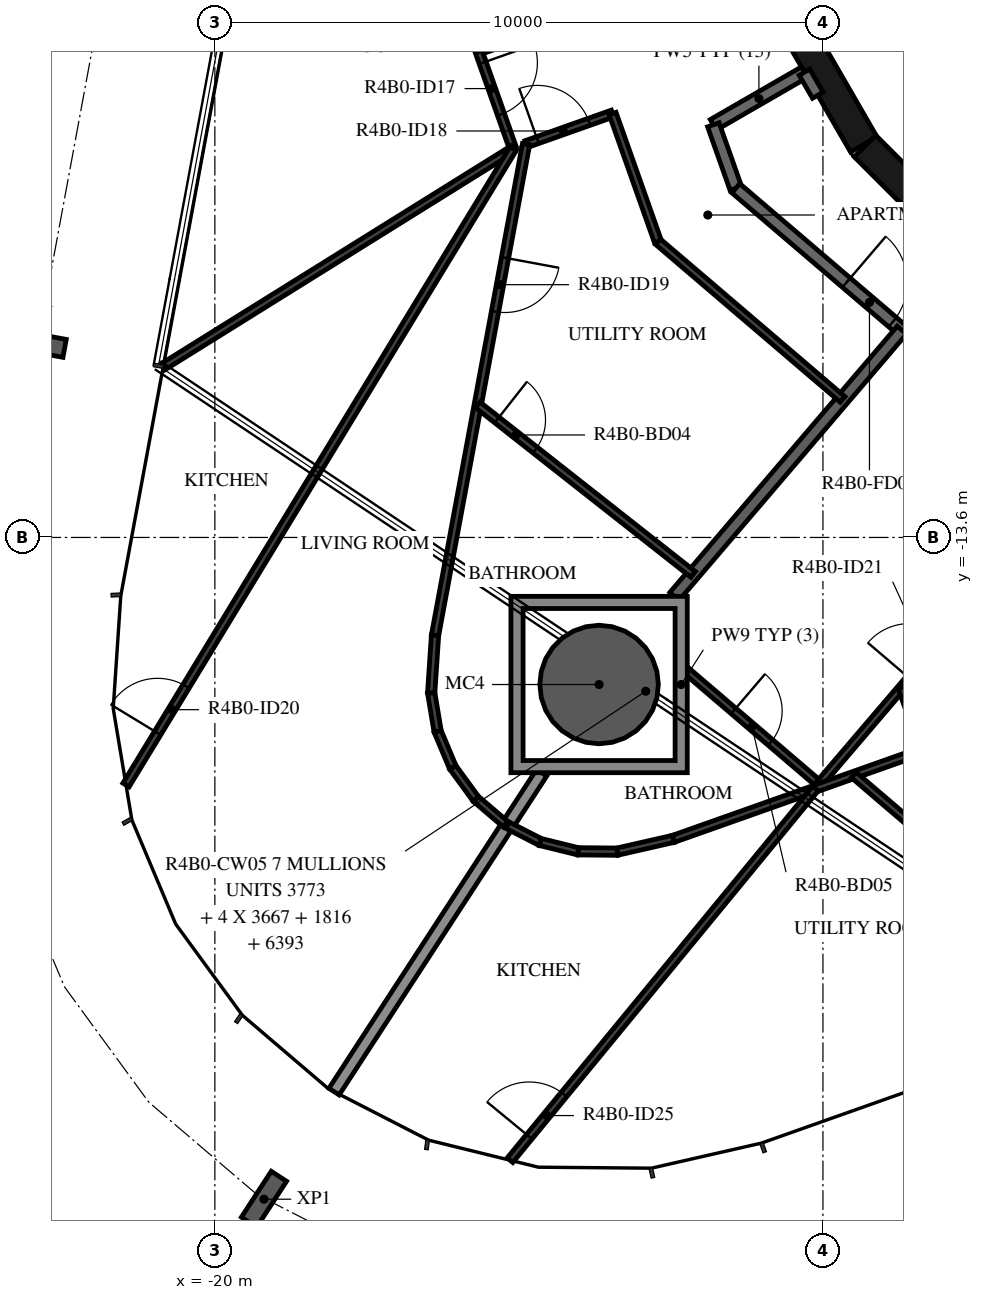
"""IFC4 building model, lengths in metres.
Left out: names, types, materials, properties, quantities, classifications, styles, units other than length and angle.
Written with IfcOpenShell. Run it as: python <this file> out.ifc"""

import sys

from ifc_helpers import new_model, si_unit, direction, frame, frame_2d, origin, origin_2d, place, context, subcontext, project, spatial, polyline, rectangle, hollow_circle, i_section, outline, extrude, element, fill, save


model = new_model("IFC4")
c1 = context("Model", 3, precision=1e-05, world=origin(), true_north=direction((0.0, 1.0)))
c2 = subcontext(c1, "Body", "Model", "MODEL_VIEW")
j1 = project(units=[si_unit("LENGTHUNIT", "METRE"), si_unit("PLANEANGLEUNIT", "RADIAN")], contexts=[c1])
p1 = place(None, origin())
s1 = spatial("IfcSite", under=j1, at=p1, CompositionType="ELEMENT")
p2 = place(p1, origin())
s2 = spatial("IfcBuilding", under=s1, at=p2, CompositionType="ELEMENT")
p3 = place(p2, frame((0.0, 0.0, 165.7)))
s3 = spatial("IfcBuildingStorey", under=s2, at=p3, CompositionType="ELEMENT", Elevation=165.7)
p4 = place(p3, frame((-13.681, -16.019, -0.38), z_axis=(0.0, 0.0, 1.0), x_axis=(1.0, 0.0, 0.0)))
e1 = element("IfcColumn", 1, at=p4, inside=s3, PredefinedType="COLUMN", context=c2, shape_type="SweptSolid", body=[
    extrude(hollow_circle(Radius=0.975, WallThickness=0.045, at=origin_2d()), origin(), (0.0, 0.0, 1.0), 3.5),
])
for number, where, z_axis, x_axis in (
    (2, (-22.914, -10.409, -0.38), (0.0, 0.0, 1.0), (0.182, 0.983, 0.0)),
    (3, (-19.192, -24.483, -0.38), (0.0, 0.0, 1.0), (-0.838, 0.546, 0.0)),
):
    element("IfcColumn", number, at=place(p3, frame(where, z_axis=z_axis, x_axis=x_axis)), inside=s3, PredefinedType="COLUMN", context=c2, shape_type="SweptSolid", body=[
        extrude(i_section(OverallWidth=0.3, OverallDepth=0.9, WebThickness=0.019, FlangeThickness=0.035, FilletRadius=0.03, at=origin_2d()), origin(), (0.0, 0.0, 1.0), 3.5),
    ])
p5 = place(p3, frame((-10.845, -4.51, 0.0), z_axis=(0.0, 0.0, 1.0), x_axis=(0.500087131594, -0.865975092491, 0.0)))
e4 = element("IfcWall", 4, at=p5, inside=s3, PredefinedType="SHEAR", context=c2, shape_type="SweptSolid", body=[
    extrude(rectangle(XDim=3.033, YDim=0.5, at=frame_2d((1.516, 0.0))), origin(), (0.0, 0.0, 1.0), 3.12),
])
p6 = place(p3, frame((-9.308, -7.164, 0.0), z_axis=(0.0, 0.0, 1.0), x_axis=(0.707106781187, -0.707106781187, 0.0)))
e5 = element("IfcWall", 5, at=p6, inside=s3, PredefinedType="SHEAR", context=c2, shape_type="SweptSolid", body=[
    extrude(rectangle(XDim=3.032, YDim=0.5, at=frame_2d((1.516, 0.0))), origin(), (0.0, 0.0, 1.0), 3.12),
])
p7 = place(p3, frame((-10.303, -5.949, 0.0), z_axis=(0.0, 0.0, 1.0), x_axis=(-0.866021168401, -0.500007335828, 0.0)))
e6 = element("IfcWall", 6, at=p7, inside=s3, PredefinedType="STANDARD", context=c2, shape_type="SweptSolid", body=[
    extrude(rectangle(XDim=1.731, YDim=0.2, at=frame_2d((0.865, 0.0))), origin(), (0.0, 0.0, 1.0), 3.12),
])
p8 = place(p3, frame((-11.802, -6.814, 0.0), z_axis=(0.0, 0.0, 1.0), x_axis=(0.333904297771, -0.942606980629, 0.0)))
e7 = element("IfcWall", 7, at=p8, inside=s3, PredefinedType="STANDARD", context=c2, shape_type="SweptSolid", body=[
    extrude(rectangle(XDim=1.107, YDim=0.2, at=frame_2d((0.553, 0.0))), origin(), (0.0, 0.0, 1.0), 3.12),
])
p9 = place(p3, frame((-11.433, -7.858, 0.0), z_axis=(0.0, 0.0, 1.0), x_axis=(0.760412154545, -0.649440801937, 0.0)))
e8 = element("IfcWall", 8, at=p9, inside=s3, PredefinedType="STANDARD", context=c2, shape_type="SweptSolid", body=[
    extrude(rectangle(XDim=7.181, YDim=0.2, at=frame_2d((3.59, 0.0))), origin(), (0.0, 0.0, 1.0), 3.12),
])
p10 = place(p9, frame((2.39, 0.0, 0.0)))
e9 = element("IfcOpeningElement", 9, at=p10, cuts=e8, PredefinedType="OPENING", context=c2, shape_type="SweptSolid", body=[
    extrude(rectangle(XDim=1.0, YDim=2.1, at=frame_2d((0.5, 1.05))), frame((0.0, 0.11, 0.0), z_axis=(0.0, -1.0, 0.0), x_axis=(1.0, 0.0, 0.0)), (0.0, 0.0, 1.0), 0.22),
])
p11 = place(p3, frame((-10.303, -5.949, 0.0), z_axis=(0.0, 0.0, 1.0), x_axis=(0.499980071345, -0.866036909293, 0.0)))
e10 = element("IfcWall", 10, at=p11, inside=s3, PredefinedType="STANDARD", context=c2, shape_type="SweptSolid", body=[
    extrude(rectangle(XDim=0.438, YDim=0.2, at=frame_2d((0.219, 0.0))), origin(), (0.0, 0.0, 1.0), 3.12),
])
p12 = place(p3, frame((-12.441, -14.569, 0.0), z_axis=(0.0, 0.0, 1.0), x_axis=(0.649446013128, 0.760407703822, 0.0)))
e11 = element("IfcWall", 11, at=p12, inside=s3, PredefinedType="STANDARD", context=c2, shape_type="SweptSolid", body=[
    extrude(rectangle(XDim=5.758, YDim=0.2, at=frame_2d((2.879, 0.0))), origin(), (0.0, 0.0, 1.0), 3.12),
])
p13 = place(p3, frame((-18.04, -22.713, 0.0), z_axis=(0.0, 0.0, 1.0), x_axis=(0.545628572271, 0.838027124335, 0.0)))
e12 = element("IfcWall", 12, at=p13, inside=s3, PredefinedType="STANDARD", context=c2, shape_type="SweptSolid", body=[
    extrude(rectangle(XDim=6.258, YDim=0.2, at=frame_2d((3.129, 0.0))), origin(), (0.0, 0.0, 1.0), 2.73),
])
p14 = place(p3, frame((-14.524, -5.203, 0.0), z_axis=(0.0, 0.0, 1.0), x_axis=(-0.942657704592, -0.333761070187, 0.0)))
e13 = element("IfcWall", 13, at=p14, inside=s3, PredefinedType="PARTITIONING", context=c2, shape_type="SweptSolid", body=[
    extrude(rectangle(XDim=1.208, YDim=0.12, at=frame_2d((0.604, 0.0))), origin(), (0.0, 0.0, 1.0), 3.12),
])
p15 = place(p3, frame((-15.663, -5.606, 0.0), z_axis=(0.0, 0.0, 1.0), x_axis=(0.333751436931, -0.942661115325, 0.0)))
e14 = element("IfcWall", 14, at=p15, inside=s3, PredefinedType="PARTITIONING", context=c2, shape_type="SweptSolid", body=[
    extrude(rectangle(XDim=1.7, YDim=0.12, at=frame_2d((0.85, 0.0))), origin(), (0.0, 0.0, 1.0), 3.12),
])
p16 = place(p15, frame((0.2, 0.0, 0.0)))
e15 = element("IfcOpeningElement", 15, at=p16, cuts=e14, PredefinedType="OPENING", context=c2, shape_type="SweptSolid", body=[
    extrude(rectangle(XDim=0.9, YDim=2.1, at=frame_2d((0.45, 1.05))), frame((0.0, 0.07, 0.0), z_axis=(0.0, -1.0, 0.0), x_axis=(1.0, 0.0, 0.0)), (0.0, 0.0, 1.0), 0.14),
])
p17 = place(p3, frame((-14.882, -7.133, 0.0), z_axis=(0.0, 0.0, 1.0), x_axis=(0.942631466676, 0.333835165961, 0.0)))
e16 = element("IfcWall", 16, at=p17, inside=s3, PredefinedType="PARTITIONING", context=c2, shape_type="SweptSolid", body=[
    extrude(rectangle(XDim=1.51, YDim=0.12, at=frame_2d((0.755, 0.0))), origin(), (0.0, 0.0, 1.0), 3.12),
])
p18 = place(p17, frame((0.2, 0.0, 0.0)))
e17 = element("IfcOpeningElement", 17, at=p18, cuts=e16, PredefinedType="OPENING", context=c2, shape_type="SweptSolid", body=[
    extrude(rectangle(XDim=0.9, YDim=2.1, at=frame_2d((0.45, 1.05))), frame((0.0, 0.07, 0.0), z_axis=(0.0, -1.0, 0.0), x_axis=(1.0, 0.0, 0.0)), (0.0, 0.0, 1.0), 0.14),
])
p19 = place(p3, frame((-13.459, -6.629, 0.0), z_axis=(0.0, 0.0, 1.0), x_axis=(0.333790565501, -0.942647260847, 0.0)))
e18 = element("IfcWall", 18, at=p19, inside=s3, PredefinedType="PARTITIONING", context=c2, shape_type="SweptSolid", body=[
    extrude(rectangle(XDim=2.237, YDim=0.12, at=frame_2d((1.118, 0.0))), origin(), (0.0, 0.0, 1.0), 3.12),
])
p20 = place(p3, frame((-12.713, -8.737, 0.0), z_axis=(0.0, 0.0, 1.0), x_axis=(0.760420863476, -0.649430604754, 0.0)))
e19 = element("IfcWall", 19, at=p20, inside=s3, PredefinedType="PARTITIONING", context=c2, shape_type="SweptSolid", body=[
    extrude(rectangle(XDim=3.992, YDim=0.12, at=frame_2d((1.996, 0.0))), origin(), (0.0, 0.0, 1.0), 3.12),
])
p21 = place(p3, frame((-20.849, -10.792, 0.0), z_axis=(0.0, 0.0, 1.0), x_axis=(0.848835001009, 0.528657867682, 0.0)))
e20 = element("IfcWall", 20, at=p21, inside=s3, PredefinedType="PARTITIONING", context=c2, shape_type="SweptSolid", body=[
    extrude(rectangle(XDim=6.778, YDim=0.12, at=frame_2d((3.389, 0.0))), origin(), (0.0, 0.0, 1.0), 3.12),
])
p22 = place(p3, frame((-21.461, -17.671, 0.0), z_axis=(0.0, 0.0, 1.0), x_axis=(0.519791999186, 0.854292852353, 0.0)))
e21 = element("IfcWall", 21, at=p22, inside=s3, PredefinedType="PARTITIONING", context=c2, shape_type="SweptSolid", body=[
    extrude(rectangle(XDim=12.247, YDim=0.12, at=frame_2d((6.124, 0.0))), origin(), (0.0, 0.0, 1.0), 3.12),
])
p23 = place(p22, frame((1.0, 0.0, 0.0)))
e22 = element("IfcOpeningElement", 22, at=p23, cuts=e21, PredefinedType="OPENING", context=c2, shape_type="SweptSolid", body=[
    extrude(rectangle(XDim=0.9, YDim=2.1, at=frame_2d((0.45, 1.05))), frame((0.0, 0.07, 0.0), z_axis=(0.0, -1.0, 0.0), x_axis=(1.0, 0.0, 0.0)), (0.0, 0.0, 1.0), 0.14),
])
p24 = place(p3, frame((-14.882, -7.133, 0.0), z_axis=(0.0, 0.0, 1.0), x_axis=(-0.182231858218, -0.983255587246, 0.0)))
e23 = element("IfcWall", 23, at=p24, inside=s3, PredefinedType="PARTITIONING", context=c2, shape_type="SweptSolid", body=[
    extrude(rectangle(XDim=8.215, YDim=0.12, at=frame_2d((4.107, 0.0))), origin(), (0.0, 0.0, 1.0), 3.12),
])
p25 = place(p24, frame((1.9, 0.0, 0.0)))
e24 = element("IfcOpeningElement", 24, at=p25, cuts=e23, PredefinedType="OPENING", context=c2, shape_type="SweptSolid", body=[
    extrude(rectangle(XDim=0.9, YDim=2.1, at=frame_2d((0.45, 1.05))), frame((0.0, 0.07, 0.0), z_axis=(0.0, -1.0, 0.0), x_axis=(1.0, 0.0, 0.0)), (0.0, 0.0, 1.0), 0.14),
])
p26 = place(p3, frame((-15.677, -11.42, 0.0), z_axis=(0.0, 0.0, 1.0), x_axis=(0.785821888461, -0.618452875824, 0.0)))
e25 = element("IfcWall", 25, at=p26, inside=s3, PredefinedType="PARTITIONING", context=c2, shape_type="SweptSolid", body=[
    extrude(rectangle(XDim=4.507, YDim=0.12, at=frame_2d((2.254, 0.0))), origin(), (0.0, 0.0, 1.0), 3.12),
])
p27 = place(p26, frame((0.4, 0.0, 0.0)))
e26 = element("IfcOpeningElement", 26, at=p27, cuts=e25, PredefinedType="OPENING", context=c2, shape_type="SweptSolid", body=[
    extrude(rectangle(XDim=0.8, YDim=2.1, at=frame_2d((0.4, 1.05))), frame((0.0, 0.07, 0.0), z_axis=(0.0, -1.0, 0.0), x_axis=(1.0, 0.0, 0.0)), (0.0, 0.0, 1.0), 0.14),
])
for number, where, z_axis, x_axis in (
    (27, (-15.22, -18.315, 0.0), (0.0, 0.0, 1.0), (-0.76, 0.65, 0.0)),
    (28, (-15.708, -17.898, 0.0), (0.0, 0.0, 1.0), (-0.59, 0.807, 0.0)),
):
    element("IfcWall", number, at=place(p3, frame(where, z_axis=z_axis, x_axis=x_axis)), inside=s3, PredefinedType="PARTITIONING", context=c2, shape_type="SweptSolid", body=[
        extrude(rectangle(XDim=0.642, YDim=0.12, at=frame_2d((0.321, 0.0))), origin(), (0.0, 0.0, 1.0), 3.12),
    ])
p28 = place(p3, frame((-16.087, -17.38, 0.0), z_axis=(0.0, 0.0, 1.0), x_axis=(-0.387852998664, 0.921721243884, 0.0)))
e29 = element("IfcWall", 29, at=p28, inside=s3, PredefinedType="PARTITIONING", context=c2, shape_type="SweptSolid", body=[
    extrude(rectangle(XDim=0.642, YDim=0.12, at=frame_2d((0.321, 0.0))), origin(), (0.0, 0.0, 1.0), 3.12),
])
p29 = place(p3, frame((-16.336, -16.788, 0.0), z_axis=(0.0, 0.0, 1.0), x_axis=(-0.165077433319, 0.986280609669, 0.0)))
e30 = element("IfcWall", 30, at=p29, inside=s3, PredefinedType="PARTITIONING", context=c2, shape_type="SweptSolid", body=[
    extrude(rectangle(XDim=0.642, YDim=0.12, at=frame_2d((0.321, 0.0))), origin(), (0.0, 0.0, 1.0), 3.12),
])
p30 = place(p3, frame((-16.442, -16.155, 0.0), z_axis=(0.0, 0.0, 1.0), x_axis=(0.066775688713, 0.997768012815, 0.0)))
e31 = element("IfcWall", 31, at=p30, inside=s3, PredefinedType="PARTITIONING", context=c2, shape_type="SweptSolid", body=[
    extrude(rectangle(XDim=0.947, YDim=0.12, at=frame_2d((0.474, 0.0))), origin(), (0.0, 0.0, 1.0), 3.12),
])
p31 = place(p3, frame((-12.231, -15.804, 0.0), z_axis=(0.0, 0.0, 1.0), x_axis=(0.760403625387, -0.649450788357, 0.0)))
e32 = element("IfcWall", 32, at=p31, inside=s3, PredefinedType="PARTITIONING", context=c2, shape_type="SweptSolid", body=[
    extrude(rectangle(XDim=2.852, YDim=0.12, at=frame_2d((1.426, 0.0))), origin(), (0.0, 0.0, 1.0), 3.12),
])
p32 = place(p31, frame((1.0, 0.0, 0.0)))
e33 = element("IfcOpeningElement", 33, at=p32, cuts=e32, PredefinedType="OPENING", context=c2, shape_type="SweptSolid", body=[
    extrude(rectangle(XDim=0.8, YDim=2.1, at=frame_2d((0.4, 1.05))), frame((0.0, 0.07, 0.0), z_axis=(0.0, -1.0, 0.0), x_axis=(1.0, 0.0, 0.0)), (0.0, 0.0, 1.0), 0.14),
])
p33 = place(p3, frame((-10.063, -17.656, 0.0), z_axis=(0.0, 0.0, 1.0), x_axis=(0.649451567172, 0.760402960211, 0.0)))
e34 = element("IfcWall", 34, at=p33, inside=s3, PredefinedType="PARTITIONING", context=c2, shape_type="SweptSolid", body=[
    extrude(rectangle(XDim=5.061, YDim=0.12, at=frame_2d((2.531, 0.0))), origin(), (0.0, 0.0, 1.0), 3.12),
])
p34 = place(p33, frame((2.288, 0.0, 0.0)))
e35 = element("IfcOpeningElement", 35, at=p34, cuts=e34, PredefinedType="OPENING", context=c2, shape_type="SweptSolid", body=[
    extrude(rectangle(XDim=0.9, YDim=2.1, at=frame_2d((0.45, 1.05))), frame((0.0, 0.07, 0.0), z_axis=(0.0, -1.0, 0.0), x_axis=(1.0, 0.0, 0.0)), (0.0, 0.0, 1.0), 0.14),
])
p35 = place(p3, frame((-1.871, -14.807, 0.0), z_axis=(0.0, 0.0, 1.0), x_axis=(-0.942640759962, -0.333808923874, 0.0)))
e36 = element("IfcWall", 36, at=p35, inside=s3, PredefinedType="PARTITIONING", context=c2, shape_type="SweptSolid", body=[
    extrude(rectangle(XDim=11.234, YDim=0.12, at=frame_2d((5.617, 0.0))), origin(), (0.0, 0.0, 1.0), 3.12),
])
p36 = place(p3, frame((-12.461, -18.557, 0.0), z_axis=(0.0, 0.0, 1.0), x_axis=(-0.975039040601, -0.222033486897, 0.0)))
e37 = element("IfcWall", 37, at=p36, inside=s3, PredefinedType="PARTITIONING", context=c2, shape_type="SweptSolid", body=[
    extrude(rectangle(XDim=0.947, YDim=0.12, at=frame_2d((0.473, 0.0))), origin(), (0.0, 0.0, 1.0), 3.12),
])
p37 = place(p3, frame((-13.384, -18.767, 0.0), z_axis=(0.0, 0.0, 1.0), x_axis=(-0.999965015064, 0.008364726362, 0.0)))
e38 = element("IfcWall", 38, at=p37, inside=s3, PredefinedType="PARTITIONING", context=c2, shape_type="SweptSolid", body=[
    extrude(rectangle(XDim=0.642, YDim=0.12, at=frame_2d((0.321, 0.0))), origin(), (0.0, 0.0, 1.0), 3.12),
])
p38 = place(p3, frame((-14.026, -18.762, 0.0), z_axis=(0.0, 0.0, 1.0), x_axis=(-0.970964611728, 0.239223165208, 0.0)))
e39 = element("IfcWall", 39, at=p38, inside=s3, PredefinedType="PARTITIONING", context=c2, shape_type="SweptSolid", body=[
    extrude(rectangle(XDim=0.642, YDim=0.12, at=frame_2d((0.321, 0.0))), origin(), (0.0, 0.0, 1.0), 3.12),
])
p39 = place(p3, frame((-14.649, -18.608, 0.0), z_axis=(0.0, 0.0, 1.0), x_axis=(-0.889695551631, 0.456554296232, 0.0)))
e40 = element("IfcWall", 40, at=p39, inside=s3, PredefinedType="PARTITIONING", context=c2, shape_type="SweptSolid", body=[
    extrude(rectangle(XDim=0.605, YDim=0.12, at=frame_2d((0.302, 0.0))), origin(), (0.0, 0.0, 1.0), 3.12),
])
p40 = place(p3, frame((-15.146, -23.841, 0.0), z_axis=(0.0, 0.0, 1.0), x_axis=(0.634970373647, 0.772536487547, 0.0)))
e41 = element("IfcWall", 41, at=p40, inside=s3, PredefinedType="PARTITIONING", context=c2, shape_type="SweptSolid", body=[
    extrude(rectangle(XDim=7.912, YDim=0.12, at=frame_2d((3.956, 0.0))), origin(), (0.0, 0.0, 1.0), 3.12),
])
p41 = place(p40, frame((0.5, 0.0, 0.0)))
e42 = element("IfcOpeningElement", 42, at=p41, cuts=e41, PredefinedType="OPENING", context=c2, shape_type="SweptSolid", body=[
    extrude(rectangle(XDim=0.9, YDim=2.1, at=frame_2d((0.45, 1.05))), frame((0.0, 0.07, 0.0), z_axis=(0.0, -1.0, 0.0), x_axis=(1.0, 0.0, 0.0)), (0.0, 0.0, 1.0), 0.14),
])
p42 = place(p3, frame((-8.342, -17.098, 0.0), z_axis=(0.0, 0.0, 1.0), x_axis=(-0.333801646268, 0.942643337084, 0.0)))
e43 = element("IfcWall", 43, at=p42, inside=s3, PredefinedType="PARTITIONING", context=c2, shape_type="SweptSolid", body=[
    extrude(rectangle(XDim=1.093, YDim=0.12, at=frame_2d((0.546, 0.0))), origin(), (0.0, 0.0, 1.0), 3.12),
])
p43 = place(p3, frame((-4.927, -21.406, 0.0), z_axis=(0.0, 0.0, 1.0), x_axis=(-0.760409236665, 0.649444218385, 0.0)))
e44 = element("IfcWall", 44, at=p43, inside=s3, PredefinedType="PARTITIONING", context=c2, shape_type="SweptSolid", body=[
    extrude(rectangle(XDim=6.004, YDim=0.12, at=frame_2d((3.002, 0.0))), origin(), (0.0, 0.0, 1.0), 3.12),
])
p44 = place(p43, frame((0.4, 0.0, 0.0)))
e45 = element("IfcOpeningElement", 45, at=p44, cuts=e44, PredefinedType="OPENING", context=c2, shape_type="SweptSolid", body=[
    extrude(rectangle(XDim=0.9, YDim=2.1, at=frame_2d((0.45, 1.05))), frame((0.0, 0.07, 0.0), z_axis=(0.0, -1.0, 0.0), x_axis=(1.0, 0.0, 0.0)), (0.0, 0.0, 1.0), 0.14),
])
p45 = place(p3, origin())
e46 = element("IfcWall", 46, at=p45, inside=s3, PredefinedType="STANDARD", context=c2, shape_type="SweptSolid", body=[
    extrude(outline(polyline([(-12.231, -14.569), (-12.231, -17.469), (-15.131, -17.469), (-15.131, -14.569), (-12.231, -14.569)]), holes=[polyline([(-14.931, -17.269), (-12.431, -17.269), (-12.431, -14.769), (-14.931, -14.769), (-14.931, -17.269)])]), origin(), (0.0, 0.0, 1.0), 3.12),
])
p46 = place(p10, origin())
e47 = element("IfcDoor", 47, at=p46, inside=s3, OperationType="SINGLE_SWING_RIGHT", PredefinedType="DOOR", context=c2, shape_type="SweptSolid", body=[
    extrude(rectangle(XDim=1.0, YDim=2.1, at=frame_2d((0.5, 1.05))), frame((0.0, 0.025, 0.0), z_axis=(0.0, -1.0, 0.0), x_axis=(1.0, 0.0, 0.0)), (0.0, 0.0, 1.0), 0.05),
])
fill(e9, e47)
p47 = place(p16, origin())
e48 = element("IfcDoor", 48, at=p47, inside=s3, OperationType="SINGLE_SWING_RIGHT", PredefinedType="DOOR", context=c2, shape_type="SweptSolid", body=[
    extrude(rectangle(XDim=0.9, YDim=2.1, at=frame_2d((0.45, 1.05))), frame((0.0, 0.025, 0.0), z_axis=(0.0, -1.0, 0.0), x_axis=(1.0, 0.0, 0.0)), (0.0, 0.0, 1.0), 0.05),
])
fill(e15, e48)
p48 = place(p18, origin())
e49 = element("IfcDoor", 49, at=p48, inside=s3, OperationType="SINGLE_SWING_LEFT", PredefinedType="DOOR", context=c2, shape_type="SweptSolid", body=[
    extrude(rectangle(XDim=0.9, YDim=2.1, at=frame_2d((0.45, 1.05))), frame((0.0, 0.025, 0.0), z_axis=(0.0, -1.0, 0.0), x_axis=(1.0, 0.0, 0.0)), (0.0, 0.0, 1.0), 0.05),
])
fill(e17, e49)
p49 = place(p25, origin())
e50 = element("IfcDoor", 50, at=p49, inside=s3, OperationType="SINGLE_SWING_RIGHT", PredefinedType="DOOR", context=c2, shape_type="SweptSolid", body=[
    extrude(rectangle(XDim=0.9, YDim=2.1, at=frame_2d((0.45, 1.05))), frame((0.0, 0.025, 0.0), z_axis=(0.0, -1.0, 0.0), x_axis=(1.0, 0.0, 0.0)), (0.0, 0.0, 1.0), 0.05),
])
fill(e24, e50)
p50 = place(p27, origin())
e51 = element("IfcDoor", 51, at=p50, inside=s3, OperationType="SINGLE_SWING_RIGHT", PredefinedType="DOOR", context=c2, shape_type="SweptSolid", body=[
    extrude(rectangle(XDim=0.8, YDim=2.1, at=frame_2d((0.4, 1.05))), frame((0.0, 0.025, 0.0), z_axis=(0.0, -1.0, 0.0), x_axis=(1.0, 0.0, 0.0)), (0.0, 0.0, 1.0), 0.05),
])
fill(e26, e51)
p51 = place(p23, origin())
e52 = element("IfcDoor", 52, at=p51, inside=s3, OperationType="SINGLE_SWING_LEFT", PredefinedType="DOOR", context=c2, shape_type="SweptSolid", body=[
    extrude(rectangle(XDim=0.9, YDim=2.1, at=frame_2d((0.45, 1.05))), frame((0.0, 0.025, 0.0), z_axis=(0.0, -1.0, 0.0), x_axis=(1.0, 0.0, 0.0)), (0.0, 0.0, 1.0), 0.05),
])
fill(e22, e52)
p52 = place(p32, origin())
e53 = element("IfcDoor", 53, at=p52, inside=s3, OperationType="SINGLE_SWING_LEFT", PredefinedType="DOOR", context=c2, shape_type="SweptSolid", body=[
    extrude(rectangle(XDim=0.8, YDim=2.1, at=frame_2d((0.4, 1.05))), frame((0.0, 0.025, 0.0), z_axis=(0.0, -1.0, 0.0), x_axis=(1.0, 0.0, 0.0)), (0.0, 0.0, 1.0), 0.05),
])
fill(e33, e53)
p53 = place(p41, origin())
e54 = element("IfcDoor", 54, at=p53, inside=s3, OperationType="SINGLE_SWING_LEFT", PredefinedType="DOOR", context=c2, shape_type="SweptSolid", body=[
    extrude(rectangle(XDim=0.9, YDim=2.1, at=frame_2d((0.45, 1.05))), frame((0.0, 0.025, 0.0), z_axis=(0.0, -1.0, 0.0), x_axis=(1.0, 0.0, 0.0)), (0.0, 0.0, 1.0), 0.05),
])
fill(e42, e54)
save(model, sys.argv[1])
